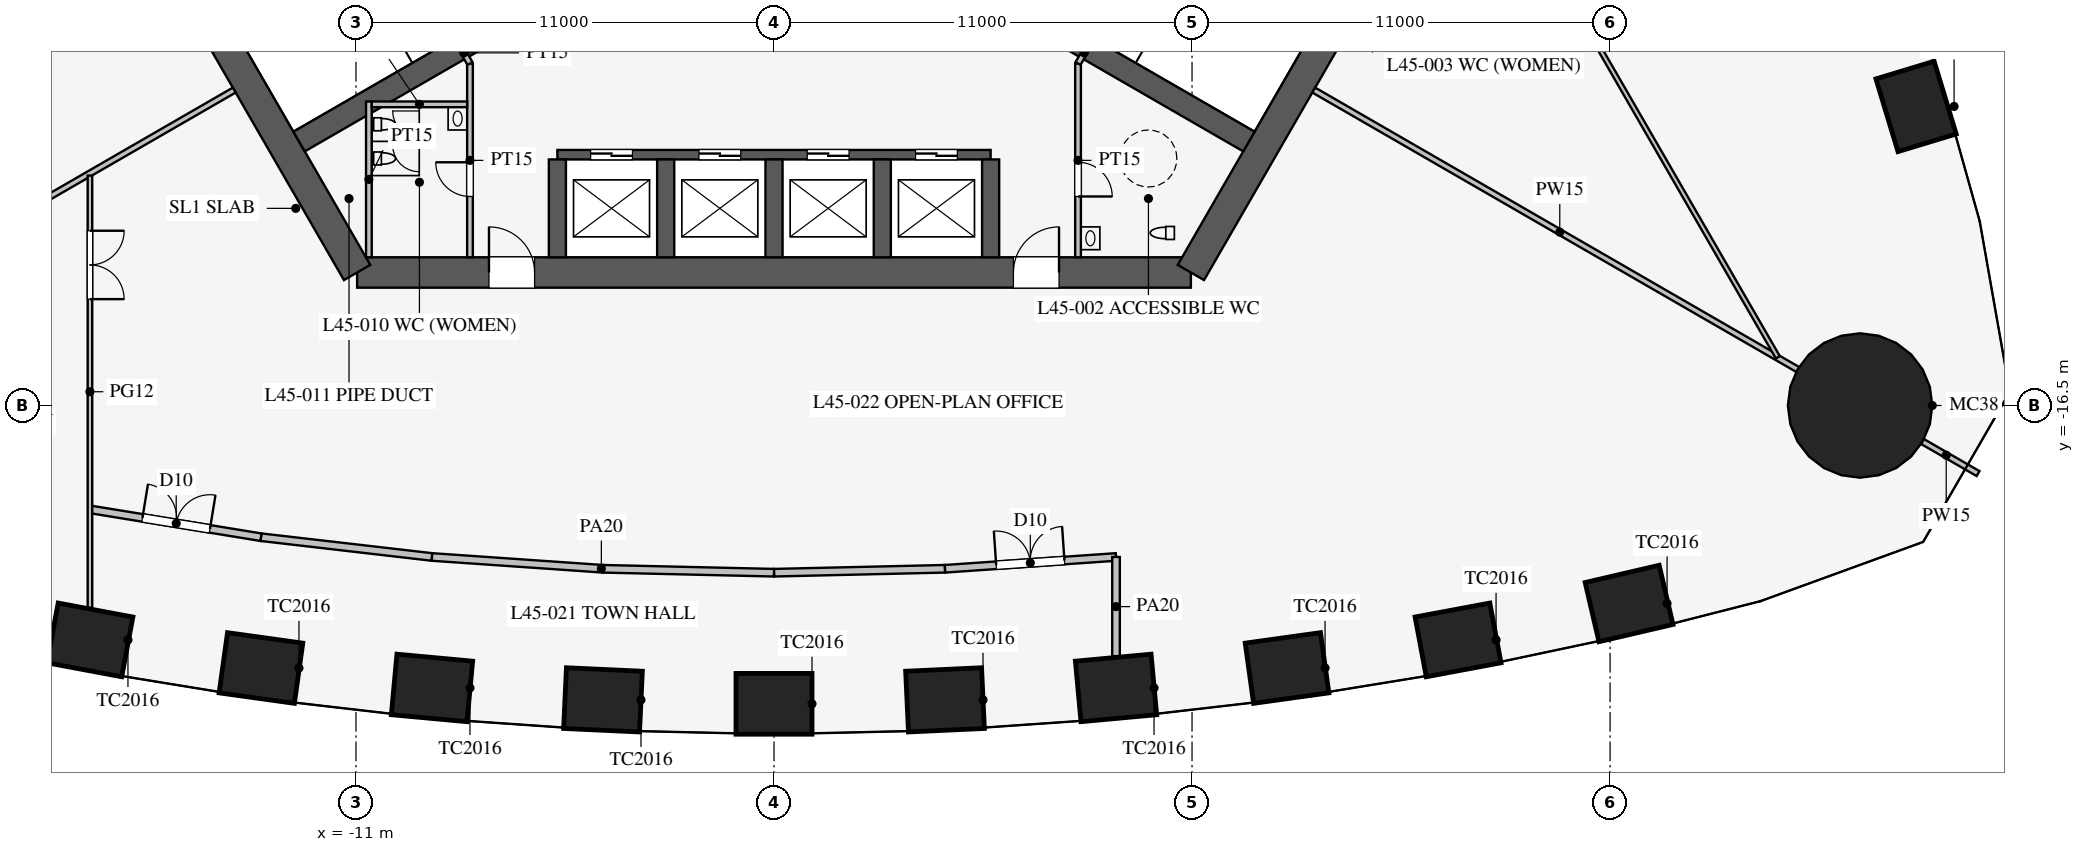
"""IFC4 building model, lengths in metres.
Left out: names, types, materials, properties, quantities, classifications, styles, units other than length and angle.
Written with IfcOpenShell. Run it as: python <this file> out.ifc"""

import sys

from ifc_helpers import new_model, si_unit, direction, frame, frame_2d, origin, origin_2d, place, context, subcontext, project, spatial, rectangle, circle, extrude, element, fill, save


model = new_model("IFC4")
c1 = context("Model", 3, precision=1e-05, world=origin(), true_north=direction((0.0, 1.0)))
c2 = subcontext(c1, "Body", "Model", "MODEL_VIEW")
j1 = project(units=[si_unit("LENGTHUNIT", "METRE"), si_unit("PLANEANGLEUNIT", "RADIAN")], contexts=[c1])
p1 = place(None, origin())
s1 = spatial("IfcSite", under=j1, at=p1, CompositionType="ELEMENT")
p2 = place(p1, origin())
s2 = spatial("IfcBuilding", under=s1, at=p2, CompositionType="ELEMENT")
p3 = place(p2, frame((0.0, 0.0, 198.1)))
s3 = spatial("IfcBuildingStorey", under=s2, at=p3, CompositionType="ELEMENT", Elevation=198.1)
for number, where, z_axis, x_axis in (
    (1, (-18.0, -22.669, 0.0), (0.0, 0.0, 1.0), (0.983, -0.184, 0.0)),
    (2, (-13.5, -23.408, 0.0), (0.0, 0.0, 1.0), (0.99, -0.138, 0.0)),
    (3, (-9.0, -23.933, 0.0), (0.0, 0.0, 1.0), (0.996, -0.092, 0.0)),
    (4, (-4.5, -24.246, 0.0), (0.0, 0.0, 1.0), (0.999, -0.046, 0.0)),
    (5, (0.0, -24.351, 0.0), (0.0, 0.0, 1.0), (1.0, 0.0, 0.0)),
    (6, (4.5, -24.246, 0.0), (0.0, 0.0, 1.0), (0.999, 0.046, 0.0)),
    (7, (9.0, -23.933, 0.0), (0.0, 0.0, 1.0), (0.996, 0.092, 0.0)),
    (8, (13.5, -23.408, 0.0), (0.0, 0.0, 1.0), (0.99, 0.138, 0.0)),
    (9, (18.0, -22.669, 0.0), (0.0, 0.0, 1.0), (0.983, 0.184, 0.0)),
    (10, (22.5, -21.71, 0.0), (0.0, 0.0, 1.0), (0.974, 0.227, 0.0)),
    (11, (30.052, -8.63, 0.0), (0.0, 0.0, 1.0), (-0.29, 0.957, 0.0)),
):
    element("IfcColumn", number, at=place(p3, frame(where, z_axis=z_axis, x_axis=x_axis)), inside=s3, PredefinedType="COLUMN", context=c2, shape_type="SweptSolid", body=[
        extrude(rectangle(XDim=2.0, YDim=1.6, at=origin_2d()), origin(), (0.0, 0.0, 1.0), 4.2),
    ])
p4 = place(p3, frame((28.579, -16.5, 0.0), z_axis=(0.0, 0.0, 1.0), x_axis=(1.0, 0.0, 0.0)))
e12 = element("IfcColumn", 12, at=p4, inside=s3, PredefinedType="COLUMN", context=c2, shape_type="SweptSolid", body=[
    extrude(circle(Radius=1.9, at=origin_2d()), origin(), (0.0, 0.0, 1.0), 4.2),
])
p5 = place(p3, frame((-10.97, -13.0, 0.0), z_axis=(0.0, 0.0, 1.0), x_axis=(1.0, 0.0, 0.0)))
e13 = element("IfcWall", 13, at=p5, inside=s3, PredefinedType="SHEAR", context=c2, shape_type="SweptSolid", body=[
    extrude(rectangle(XDim=21.939, YDim=0.8, at=frame_2d((10.97, 0.0))), origin(), (0.0, 0.0, 1.0), 4.2),
])
p6 = place(p5, frame((17.27, 0.0, 0.0)))
e14 = element("IfcOpeningElement", 14, at=p6, cuts=e13, PredefinedType="OPENING", context=c2, shape_type="SweptSolid", body=[
    extrude(rectangle(XDim=1.2, YDim=2.1, at=frame_2d((0.6, 1.05))), frame((0.0, 0.41, 0.0), z_axis=(0.0, -1.0, 0.0), x_axis=(1.0, 0.0, 0.0)), (0.0, 0.0, 1.0), 0.82),
])
p7 = place(p5, frame((3.47, 0.0, 0.0)))
e15 = element("IfcOpeningElement", 15, at=p7, cuts=e13, PredefinedType="OPENING", context=c2, shape_type="SweptSolid", body=[
    extrude(rectangle(XDim=1.2, YDim=2.1, at=frame_2d((0.6, 1.05))), frame((0.0, 0.41, 0.0), z_axis=(0.0, -1.0, 0.0), x_axis=(1.0, 0.0, 0.0)), (0.0, 0.0, 1.0), 0.82),
])
for number, where, z_axis, x_axis in (
    (16, (10.97, -13.0, 0.0), (0.0, 0.0, 1.0), (0.5, 0.866, 0.0)),
    (17, (-16.743, -3.0, 0.0), (0.0, 0.0, 1.0), (0.5, -0.866, 0.0)),
):
    element("IfcWall", number, at=place(p3, frame(where, z_axis=z_axis, x_axis=x_axis)), inside=s3, PredefinedType="SHEAR", context=c2, shape_type="SweptSolid", body=[
        extrude(rectangle(XDim=11.547, YDim=0.8, at=frame_2d((5.773, 0.0))), origin(), (0.0, 0.0, 1.0), 4.2),
    ])
p8 = place(p3, frame((-5.7, -9.9, 0.0), z_axis=(0.0, 0.0, 1.0), x_axis=(1.0, 0.0, 0.0)))
e18 = element("IfcWall", 18, at=p8, inside=s3, PredefinedType="SHEAR", context=c2, shape_type="SweptSolid", body=[
    extrude(rectangle(XDim=11.4, YDim=0.25, at=frame_2d((5.7, 0.0))), origin(), (0.0, 0.0, 1.0), 4.2),
])
p9 = place(p8, frame((0.875, 0.0, 0.0)))
e19 = element("IfcOpeningElement", 19, at=p9, cuts=e18, PredefinedType="OPENING", context=c2, shape_type="SweptSolid", body=[
    extrude(rectangle(XDim=1.1, YDim=2.2, at=frame_2d((0.55, 1.1))), frame((0.0, 0.135, 0.0), z_axis=(0.0, -1.0, 0.0), x_axis=(1.0, 0.0, 0.0)), (0.0, 0.0, 1.0), 0.27),
])
p10 = place(p8, frame((3.725, 0.0, 0.0)))
e20 = element("IfcOpeningElement", 20, at=p10, cuts=e18, PredefinedType="OPENING", context=c2, shape_type="SweptSolid", body=[
    extrude(rectangle(XDim=1.1, YDim=2.2, at=frame_2d((0.55, 1.1))), frame((0.0, 0.135, 0.0), z_axis=(0.0, -1.0, 0.0), x_axis=(1.0, 0.0, 0.0)), (0.0, 0.0, 1.0), 0.27),
])
p11 = place(p8, frame((6.575, 0.0, 0.0)))
e21 = element("IfcOpeningElement", 21, at=p11, cuts=e18, PredefinedType="OPENING", context=c2, shape_type="SweptSolid", body=[
    extrude(rectangle(XDim=1.1, YDim=2.2, at=frame_2d((0.55, 1.1))), frame((0.0, 0.135, 0.0), z_axis=(0.0, -1.0, 0.0), x_axis=(1.0, 0.0, 0.0)), (0.0, 0.0, 1.0), 0.27),
])
p12 = place(p8, frame((9.425, 0.0, 0.0)))
e22 = element("IfcOpeningElement", 22, at=p12, cuts=e18, PredefinedType="OPENING", context=c2, shape_type="SweptSolid", body=[
    extrude(rectangle(XDim=1.1, YDim=2.2, at=frame_2d((0.55, 1.1))), frame((0.0, 0.135, 0.0), z_axis=(0.0, -1.0, 0.0), x_axis=(1.0, 0.0, 0.0)), (0.0, 0.0, 1.0), 0.27),
])
for number, where, z_axis, x_axis in (
    (23, (-5.7, -10.025, 0.0), (0.0, 0.0, 1.0), (0.0, -1.0, 0.0)),
    (24, (-2.85, -10.025, 0.0), (0.0, 0.0, 1.0), (0.0, -1.0, 0.0)),
    (25, (0.0, -10.025, 0.0), (0.0, 0.0, 1.0), (0.0, -1.0, 0.0)),
    (26, (2.85, -10.025, 0.0), (0.0, 0.0, 1.0), (0.0, -1.0, 0.0)),
    (27, (5.7, -10.025, 0.0), (0.0, 0.0, 1.0), (0.0, -1.0, 0.0)),
):
    element("IfcWall", number, at=place(p3, frame(where, z_axis=z_axis, x_axis=x_axis)), inside=s3, PredefinedType="SHEAR", context=c2, shape_type="SweptSolid", body=[
        extrude(rectangle(XDim=2.575, YDim=0.45, at=frame_2d((1.288, 0.0))), origin(), (0.0, 0.0, 1.0), 4.2),
    ])
for number, where, z_axis, x_axis in (
    (28, (4.638, -5.016, 0.0), (0.0, 0.0, 1.0), (0.866, -0.5, 0.0)),
    (29, (-4.638, -5.016, 0.0), (0.0, 0.0, 1.0), (-0.866, -0.5, 0.0)),
):
    element("IfcWall", number, at=place(p3, frame(where, z_axis=z_axis, x_axis=x_axis)), inside=s3, PredefinedType="SHEAR", context=c2, shape_type="SweptSolid", body=[
        extrude(rectangle(XDim=9.075, YDim=0.6, at=frame_2d((4.538, 0.0))), origin(), (0.0, 0.0, 1.0), 4.2),
    ])
p13 = place(p3, frame((8.0, -7.5, 0.0), z_axis=(0.0, 0.0, 1.0), x_axis=(0.0, -1.0, 0.0)))
e30 = element("IfcWall", 30, at=p13, inside=s3, PredefinedType="PARTITIONING", context=c2, shape_type="SweptSolid", body=[
    extrude(rectangle(XDim=5.1, YDim=0.15, at=frame_2d((2.55, 0.0))), origin(), (0.0, 0.0, 1.0), 4.0),
])
p14 = place(p13, frame((2.6, 0.0, 0.0)))
e31 = element("IfcOpeningElement", 31, at=p14, cuts=e30, PredefinedType="OPENING", context=c2, shape_type="SweptSolid", body=[
    extrude(rectangle(XDim=0.9, YDim=2.1, at=frame_2d((0.45, 1.05))), frame((0.0, 0.085, 0.0), z_axis=(0.0, -1.0, 0.0), x_axis=(1.0, 0.0, 0.0)), (0.0, 0.0, 1.0), 0.17),
])
p15 = place(p3, frame((-8.0, -7.5, 0.0), z_axis=(0.0, 0.0, 1.0), x_axis=(0.0, -1.0, 0.0)))
e32 = element("IfcWall", 32, at=p15, inside=s3, PredefinedType="PARTITIONING", context=c2, shape_type="SweptSolid", body=[
    extrude(rectangle(XDim=5.1, YDim=0.15, at=frame_2d((2.55, 0.0))), origin(), (0.0, 0.0, 1.0), 4.0),
])
p16 = place(p15, frame((2.6, 0.0, 0.0)))
e33 = element("IfcOpeningElement", 33, at=p16, cuts=e32, PredefinedType="OPENING", context=c2, shape_type="SweptSolid", body=[
    extrude(rectangle(XDim=0.9, YDim=2.1, at=frame_2d((0.45, 1.05))), frame((0.0, 0.085, 0.0), z_axis=(0.0, -1.0, 0.0), x_axis=(1.0, 0.0, 0.0)), (0.0, 0.0, 1.0), 0.17),
])
for number, where, z_axis, x_axis in (
    (34, (8.0, -7.5, 0.0), (0.0, 0.0, 1.0), (0.5, 0.866, 0.0)),
    (35, (-8.0, -7.5, 0.0), (0.0, 0.0, 1.0), (-0.5, 0.866, 0.0)),
):
    element("IfcWall", number, at=place(p3, frame(where, z_axis=z_axis, x_axis=x_axis)), inside=s3, PredefinedType="PARTITIONING", context=c2, shape_type="SweptSolid", body=[
        extrude(rectangle(XDim=0.645, YDim=0.15, at=frame_2d((0.323, 0.0))), origin(), (0.0, 0.0, 1.0), 4.0),
    ])
p17 = place(p3, frame((-10.66, -8.5, 0.0), z_axis=(0.0, 0.0, 1.0), x_axis=(0.0, -1.0, 0.0)))
e36 = element("IfcWall", 36, at=p17, inside=s3, PredefinedType="PARTITIONING", context=c2, shape_type="SweptSolid", body=[
    extrude(rectangle(XDim=4.1, YDim=0.15, at=frame_2d((2.05, 0.0))), origin(), (0.0, 0.0, 1.0), 4.0),
])
p18 = place(p3, frame((-8.075, -8.575, 0.0), z_axis=(0.0, 0.0, 1.0), x_axis=(-1.0, 0.0, 0.0)))
e37 = element("IfcWall", 37, at=p18, inside=s3, PredefinedType="PARTITIONING", context=c2, shape_type="SweptSolid", body=[
    extrude(rectangle(XDim=2.51, YDim=0.15, at=frame_2d((1.255, 0.0))), origin(), (0.0, 0.0, 1.0), 4.0),
])
p19 = place(p3, frame((14.203, -8.2, 0.0), z_axis=(0.0, 0.0, 1.0), x_axis=(0.866021600284, -0.500006587798, 0.0)))
e38 = element("IfcWall", 38, at=p19, inside=s3, PredefinedType="PARTITIONING", context=c2, shape_type="SweptSolid", body=[
    extrude(rectangle(XDim=14.95, YDim=0.15, at=frame_2d((7.475, 0.0))), origin(), (0.0, 0.0, 1.0), 2.4),
])
p20 = place(p3, frame((30.008, -17.325, 0.0), z_axis=(0.0, 0.0, 1.0), x_axis=(0.866013246922, -0.500021055713, 0.0)))
e39 = element("IfcWall", 39, at=p20, inside=s3, PredefinedType="PARTITIONING", context=c2, shape_type="SweptSolid", body=[
    extrude(rectangle(XDim=1.935, YDim=0.15, at=frame_2d((0.967, 0.0))), origin(), (0.0, 0.0, 1.0), 2.4),
])
p21 = place(p3, frame((-14.203, -8.2, 0.0), z_axis=(0.0, 0.0, 1.0), x_axis=(-0.866021600284, -0.500006587798, 0.0)))
e40 = element("IfcWall", 40, at=p21, inside=s3, PredefinedType="PARTITIONING", context=c2, shape_type="SweptSolid", body=[
    extrude(rectangle(XDim=14.95, YDim=0.15, at=frame_2d((7.475, 0.0))), origin(), (0.0, 0.0, 1.0), 2.4),
])
p22 = place(p3, frame((0.0, -20.901, 0.0), z_axis=(0.0, 0.0, 1.0), x_axis=(0.99973552509, 0.022997388381, 0.0)))
e41 = element("IfcWall", 41, at=p22, inside=s3, PredefinedType="PARTITIONING", context=c2, shape_type="SweptSolid", body=[
    extrude(rectangle(XDim=4.501, YDim=0.2, at=frame_2d((2.25, 0.0))), origin(), (0.0, 0.0, 1.0), 2.9),
])
p23 = place(p3, frame((4.5, -20.797, 0.0), z_axis=(0.0, 0.0, 1.0), x_axis=(0.997623533978, 0.068900540297, 0.0)))
e42 = element("IfcWall", 42, at=p23, inside=s3, PredefinedType="PARTITIONING", context=c2, shape_type="SweptSolid", body=[
    extrude(rectangle(XDim=4.511, YDim=0.2, at=frame_2d((2.255, 0.0))), origin(), (0.0, 0.0, 1.0), 2.9),
])
p24 = place(p23, frame((1.35, 0.0, 0.15)))
e43 = element("IfcOpeningElement", 43, at=p24, cuts=e42, PredefinedType="OPENING", context=c2, shape_type="SweptSolid", body=[
    extrude(rectangle(XDim=1.8, YDim=2.1, at=frame_2d((0.9, 1.05))), frame((0.0, 0.11, 0.0), z_axis=(0.0, -1.0, 0.0), x_axis=(1.0, 0.0, 0.0)), (0.0, 0.0, 1.0), 0.22),
])
p25 = place(p3, frame((-13.5, -19.966, 0.0), z_axis=(0.0, 0.0, 1.0), x_axis=(0.993382946625, -0.114849124309, 0.0)))
e44 = element("IfcWall", 44, at=p25, inside=s3, PredefinedType="PARTITIONING", context=c2, shape_type="SweptSolid", body=[
    extrude(rectangle(XDim=4.53, YDim=0.2, at=frame_2d((2.265, 0.0))), origin(), (0.0, 0.0, 1.0), 2.9),
])
p26 = place(p3, frame((-18.0, -19.233, 0.0), z_axis=(0.0, 0.0, 1.0), x_axis=(0.986986525477, -0.160802980469, 0.0)))
e45 = element("IfcWall", 45, at=p26, inside=s3, PredefinedType="PARTITIONING", context=c2, shape_type="SweptSolid", body=[
    extrude(rectangle(XDim=4.559, YDim=0.2, at=frame_2d((2.28, 0.0))), origin(), (0.0, 0.0, 1.0), 2.9),
])
p27 = place(p26, frame((1.4, 0.0, 0.15)))
e46 = element("IfcOpeningElement", 46, at=p27, cuts=e45, PredefinedType="OPENING", context=c2, shape_type="SweptSolid", body=[
    extrude(rectangle(XDim=1.8, YDim=2.1, at=frame_2d((0.9, 1.05))), frame((0.0, 0.11, 0.0), z_axis=(0.0, -1.0, 0.0), x_axis=(1.0, 0.0, 0.0)), (0.0, 0.0, 1.0), 0.22),
])
p28 = place(p3, frame((-4.5, -20.797, 0.0), z_axis=(0.0, 0.0, 1.0), x_axis=(0.99973552509, -0.022997388381, 0.0)))
e47 = element("IfcWall", 47, at=p28, inside=s3, PredefinedType="PARTITIONING", context=c2, shape_type="SweptSolid", body=[
    extrude(rectangle(XDim=4.501, YDim=0.2, at=frame_2d((2.25, 0.0))), origin(), (0.0, 0.0, 1.0), 2.9),
])
p29 = place(p3, frame((-9.0, -20.486, 0.0), z_axis=(0.0, 0.0, 1.0), x_axis=(0.997623533978, -0.068900540297, 0.0)))
e48 = element("IfcWall", 48, at=p29, inside=s3, PredefinedType="PARTITIONING", context=c2, shape_type="SweptSolid", body=[
    extrude(rectangle(XDim=4.511, YDim=0.2, at=frame_2d((2.255, 0.0))), origin(), (0.0, 0.0, 1.0), 2.9),
])
p30 = place(p3, frame((9.0, -20.486, 0.0), z_axis=(0.0, 0.0, 1.0), x_axis=(0.0, -1.0, 0.0)))
e49 = element("IfcWall", 49, at=p30, inside=s3, PredefinedType="PARTITIONING", context=c2, shape_type="SweptSolid", body=[
    extrude(rectangle(XDim=2.613, YDim=0.2, at=frame_2d((1.307, 0.0))), origin(), (0.0, 0.0, 1.0), 2.9),
])
p31 = place(p3, frame((-18.0, -10.451, 0.0), z_axis=(0.0, 0.0, 1.0), x_axis=(0.0, -1.0, 0.0)))
e50 = element("IfcWall", 50, at=p31, inside=s3, PredefinedType="PARTITIONING", context=c2, shape_type="SweptSolid", body=[
    extrude(rectangle(XDim=11.374, YDim=0.12, at=frame_2d((5.687, 0.0))), origin(), (0.0, 0.0, 1.0), 2.8),
])
p32 = place(p31, frame((1.45, 0.0, 0.15)))
e51 = element("IfcOpeningElement", 51, at=p32, cuts=e50, PredefinedType="OPENING", context=c2, shape_type="SweptSolid", body=[
    extrude(rectangle(XDim=1.8, YDim=2.1, at=frame_2d((0.9, 1.05))), frame((0.0, 0.07, 0.0), z_axis=(0.0, -1.0, 0.0), x_axis=(1.0, 0.0, 0.0)), (0.0, 0.0, 1.0), 0.14),
])
p33 = place(p3, frame((26.415, -15.231, 0.0), z_axis=(0.0, 0.0, 1.0), x_axis=(-0.50000091641, 0.866024874695, 0.0)))
e52 = element("IfcWall", 52, at=p33, inside=s3, PredefinedType="PARTITIONING", context=c2, shape_type="SweptSolid", body=[
    extrude(rectangle(XDim=52.796, YDim=0.12, at=frame_2d((26.398, 0.0))), origin(), (0.0, 0.0, 1.0), 2.9),
])
p34 = place(p33, frame((10.2, 0.0, 0.15)))
e53 = element("IfcOpeningElement", 53, at=p34, cuts=e52, PredefinedType="OPENING", context=c2, shape_type="SweptSolid", body=[
    extrude(rectangle(XDim=1.8, YDim=2.1, at=frame_2d((0.9, 1.05))), frame((0.0, 0.07, 0.0), z_axis=(0.0, -1.0, 0.0), x_axis=(1.0, 0.0, 0.0)), (0.0, 0.0, 1.0), 0.14),
])
p35 = place(p33, frame((40.8, 0.0, 0.15)))
e54 = element("IfcOpeningElement", 54, at=p35, cuts=e52, PredefinedType="OPENING", context=c2, shape_type="SweptSolid", body=[
    extrude(rectangle(XDim=1.8, YDim=2.1, at=frame_2d((0.9, 1.05))), frame((0.0, 0.07, 0.0), z_axis=(0.0, -1.0, 0.0), x_axis=(1.0, 0.0, 0.0)), (0.0, 0.0, 1.0), 0.14),
])
p36 = place(p14, origin())
e55 = element("IfcDoor", 55, at=p36, inside=s3, OperationType="SINGLE_SWING_RIGHT", PredefinedType="DOOR", context=c2, shape_type="SweptSolid", body=[
    extrude(rectangle(XDim=0.9, YDim=2.1, at=frame_2d((0.45, 1.05))), frame((0.0, 0.025, 0.0), z_axis=(0.0, -1.0, 0.0), x_axis=(1.0, 0.0, 0.0)), (0.0, 0.0, 1.0), 0.05),
])
fill(e31, e55)
p37 = place(p16, frame((0.9, 0.0, 0.0), z_axis=(0.0, 0.0, 1.0), x_axis=(-1.0, 0.0, 0.0)))
e56 = element("IfcDoor", 56, at=p37, inside=s3, OperationType="SINGLE_SWING_RIGHT", PredefinedType="DOOR", context=c2, shape_type="SweptSolid", body=[
    extrude(rectangle(XDim=0.9, YDim=2.1, at=frame_2d((0.45, 1.05))), frame((0.0, 0.025, 0.0), z_axis=(0.0, -1.0, 0.0), x_axis=(1.0, 0.0, 0.0)), (0.0, 0.0, 1.0), 0.05),
])
fill(e33, e56)
p38 = place(p6, origin())
e57 = element("IfcDoor", 57, at=p38, inside=s3, OperationType="SINGLE_SWING_RIGHT", PredefinedType="DOOR", context=c2, shape_type="SweptSolid", body=[
    extrude(rectangle(XDim=1.2, YDim=2.1, at=frame_2d((0.6, 1.05))), frame((0.0, 0.025, 0.0), z_axis=(0.0, -1.0, 0.0), x_axis=(1.0, 0.0, 0.0)), (0.0, 0.0, 1.0), 0.05),
])
fill(e14, e57)
p39 = place(p7, origin())
e58 = element("IfcDoor", 58, at=p39, inside=s3, OperationType="SINGLE_SWING_LEFT", PredefinedType="DOOR", context=c2, shape_type="SweptSolid", body=[
    extrude(rectangle(XDim=1.2, YDim=2.1, at=frame_2d((0.6, 1.05))), frame((0.0, 0.025, 0.0), z_axis=(0.0, -1.0, 0.0), x_axis=(1.0, 0.0, 0.0)), (0.0, 0.0, 1.0), 0.05),
])
fill(e15, e58)
p40 = place(p32, origin())
e59 = element("IfcDoor", 59, at=p40, inside=s3, OperationType="DOUBLE_DOOR_SINGLE_SWING", PredefinedType="DOOR", context=c2, shape_type="SweptSolid", body=[
    extrude(rectangle(XDim=1.8, YDim=2.1, at=frame_2d((0.9, 1.05))), frame((0.0, 0.025, 0.0), z_axis=(0.0, -1.0, 0.0), x_axis=(1.0, 0.0, 0.0)), (0.0, 0.0, 1.0), 0.05),
])
fill(e51, e59)
p41 = place(p27, origin())
e60 = element("IfcDoor", 60, at=p41, inside=s3, OperationType="DOUBLE_DOOR_SINGLE_SWING", PredefinedType="DOOR", context=c2, shape_type="SweptSolid", body=[
    extrude(rectangle(XDim=1.8, YDim=2.1, at=frame_2d((0.9, 1.05))), frame((0.0, 0.025, 0.0), z_axis=(0.0, -1.0, 0.0), x_axis=(1.0, 0.0, 0.0)), (0.0, 0.0, 1.0), 0.05),
])
fill(e46, e60)
p42 = place(p24, origin())
e61 = element("IfcDoor", 61, at=p42, inside=s3, OperationType="DOUBLE_DOOR_SINGLE_SWING", PredefinedType="DOOR", context=c2, shape_type="SweptSolid", body=[
    extrude(rectangle(XDim=1.8, YDim=2.1, at=frame_2d((0.9, 1.05))), frame((0.0, 0.025, 0.0), z_axis=(0.0, -1.0, 0.0), x_axis=(1.0, 0.0, 0.0)), (0.0, 0.0, 1.0), 0.05),
])
fill(e43, e61)
p43 = place(p9, origin())
e62 = element("IfcDoor", 62, at=p43, inside=s3, OperationType="DOUBLE_DOOR_SLIDING", PredefinedType="DOOR", context=c2, shape_type="SweptSolid", body=[
    extrude(rectangle(XDim=1.1, YDim=2.2, at=frame_2d((0.55, 1.1))), frame((0.0, 0.025, 0.0), z_axis=(0.0, -1.0, 0.0), x_axis=(1.0, 0.0, 0.0)), (0.0, 0.0, 1.0), 0.05),
])
fill(e19, e62)
p44 = place(p10, origin())
e63 = element("IfcDoor", 63, at=p44, inside=s3, OperationType="DOUBLE_DOOR_SLIDING", PredefinedType="DOOR", context=c2, shape_type="SweptSolid", body=[
    extrude(rectangle(XDim=1.1, YDim=2.2, at=frame_2d((0.55, 1.1))), frame((0.0, 0.025, 0.0), z_axis=(0.0, -1.0, 0.0), x_axis=(1.0, 0.0, 0.0)), (0.0, 0.0, 1.0), 0.05),
])
fill(e20, e63)
p45 = place(p11, origin())
e64 = element("IfcDoor", 64, at=p45, inside=s3, OperationType="DOUBLE_DOOR_SLIDING", PredefinedType="DOOR", context=c2, shape_type="SweptSolid", body=[
    extrude(rectangle(XDim=1.1, YDim=2.2, at=frame_2d((0.55, 1.1))), frame((0.0, 0.025, 0.0), z_axis=(0.0, -1.0, 0.0), x_axis=(1.0, 0.0, 0.0)), (0.0, 0.0, 1.0), 0.05),
])
fill(e21, e64)
p46 = place(p12, origin())
e65 = element("IfcDoor", 65, at=p46, inside=s3, OperationType="DOUBLE_DOOR_SLIDING", PredefinedType="DOOR", context=c2, shape_type="SweptSolid", body=[
    extrude(rectangle(XDim=1.1, YDim=2.2, at=frame_2d((0.55, 1.1))), frame((0.0, 0.025, 0.0), z_axis=(0.0, -1.0, 0.0), x_axis=(1.0, 0.0, 0.0)), (0.0, 0.0, 1.0), 0.05),
])
fill(e22, e65)
save(model, sys.argv[1])
